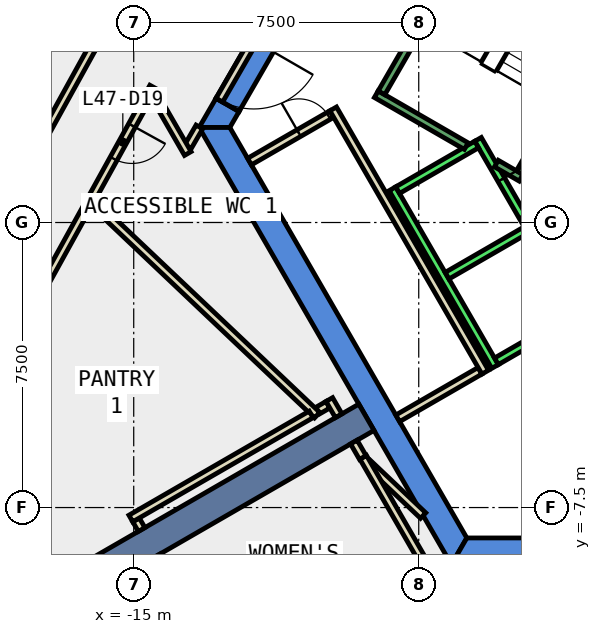
"""IFC4 building model, lengths in metres.
Left out: names, types, materials, properties, quantities, classifications, styles, units other than length and angle.
Written with IfcOpenShell. Run it as: python <this file> out.ifc"""

import sys

from ifc_helpers import new_model, si_unit, direction, frame, frame_2d, origin, place, context, subcontext, project, spatial, polyline, rectangle, outline, extrude, element, fill, save


model = new_model("IFC4")
c1 = context("Model", 3, precision=1e-05, world=origin(), true_north=direction((0.0, 1.0)))
c2 = subcontext(c1, "Body", "Model", "MODEL_VIEW")
j1 = project(units=[si_unit("LENGTHUNIT", "METRE"), si_unit("PLANEANGLEUNIT", "RADIAN")], contexts=[c1])
p1 = place(None, origin())
s1 = spatial("IfcSite", under=j1, at=p1, CompositionType="ELEMENT")
p2 = place(p1, origin())
s2 = spatial("IfcBuilding", under=s1, at=p2, CompositionType="ELEMENT")
p3 = place(p2, frame((0.0, 0.0, 210.8)))
s3 = spatial("IfcBuildingStorey", under=s2, at=p3, CompositionType="ELEMENT", Elevation=210.8)
p4 = place(p3, frame((0.0, 0.0, -0.4)))
e1 = element("IfcWall", 1, at=p4, inside=s3, PredefinedType="SHEAR", context=c2, shape_type="SweptSolid", body=[
    extrude(outline(polyline([(-12.228, 2.92), (-12.834, 3.27), (-13.279, 2.5), (-12.471, 2.5), (-12.228, 2.92)])), origin(), (0.0, 0.0, 1.0), 4.2),
])
p5 = place(p3, frame((0.0, 0.0, 3.6)))
e2 = element("IfcWall", 2, at=p5, inside=s3, PredefinedType="SHEAR", context=c2, shape_type="SweptSolid", body=[
    extrude(outline(polyline([(-12.834, 3.27), (-12.228, 2.92), (-11.228, 4.652), (-11.834, 5.002), (-12.834, 3.27)])), origin(), (0.0, 0.0, 1.0), 0.2),
])
p6 = place(p3, frame((0.0, 0.0, -0.4)))
e3 = element("IfcWall", 3, at=p6, inside=s3, PredefinedType="SHEAR", context=c2, shape_type="SweptSolid", body=[
    extrude(outline(polyline([(-13.279, 2.5), (-6.64, -9.0), (-6.235, -8.3), (-12.471, 2.5), (-13.279, 2.5)])), origin(), (0.0, 0.0, 1.0), 4.2),
])
p7 = place(p3, frame((0.0, 0.0, -0.4)))
e4 = element("IfcWall", 4, at=p7, inside=s3, PredefinedType="SHEAR", context=c2, shape_type="SweptSolid", body=[
    extrude(outline(polyline([(3.75, -9.0), (3.75, -8.3), (-6.235, -8.3), (-6.64, -9.0), (3.75, -9.0)])), origin(), (0.0, 0.0, 1.0), 4.2),
])
p8 = place(p3, frame((-8.877, -5.125, -0.4), z_axis=(0.0, 0.0, 1.0), x_axis=(-0.866017533419, -0.500013631625, 0.0)))
e5 = element("IfcWall", 5, at=p8, inside=s3, PredefinedType="SHEAR", context=c2, shape_type="SweptSolid", body=[
    extrude(rectangle(XDim=9.0, YDim=0.8, at=frame_2d((4.5, 0.0))), origin(), (0.0, 0.0, 1.0), 4.2),
])
p9 = place(p3, frame((-13.273, 2.514, 0.0), z_axis=(0.0, 0.0, 1.0), x_axis=(-0.50111559984, -0.865380353138, 0.0)))
e6 = element("IfcWall", 6, at=p9, inside=s3, PredefinedType="PARTITIONING", context=c2, shape_type="SweptSolid", body=[
    extrude(rectangle(XDim=0.606, YDim=0.2, at=frame_2d((0.303, 0.0))), origin(), (0.0, 0.0, 1.0), 3.8),
])
p10 = place(p3, frame((-13.577, 1.815, 0.0), z_axis=(0.0, 0.0, 1.0), x_axis=(-0.499951005625, 0.866053688852, 0.0)))
e7 = element("IfcWall", 7, at=p10, inside=s3, PredefinedType="PARTITIONING", context=c2, shape_type="SweptSolid", body=[
    extrude(rectangle(XDim=1.819, YDim=0.2, at=frame_2d((0.909, 0.0))), origin(), (0.0, 0.0, 1.0), 3.8),
])
p11 = place(p3, frame((-14.487, 3.564, 0.0), z_axis=(0.0, 0.0, 1.0), x_axis=(-0.483555199903, -0.875313868648, 0.0)))
e8 = element("IfcWall", 8, at=p11, inside=s3, PredefinedType="PARTITIONING", context=c2, shape_type="SweptSolid", body=[
    extrude(rectangle(XDim=3.309, YDim=0.2, at=frame_2d((1.654, 0.0))), origin(), (0.0, 0.0, 1.0), 3.8),
])
p12 = place(p11, frame((1.154, 0.0, 0.0)))
e9 = element("IfcOpeningElement", 9, at=p12, cuts=e8, PredefinedType="OPENING", context=c2, shape_type="SweptSolid", body=[
    extrude(rectangle(XDim=1.0, YDim=2.1, at=frame_2d((0.5, 1.05))), frame((0.0, 0.11, 0.0), z_axis=(0.0, -1.0, 0.0), x_axis=(1.0, 0.0, 0.0)), (0.0, 0.0, 1.0), 0.22),
])
p13 = place(p3, frame((-16.184, 0.493, 0.0), z_axis=(0.0, 0.0, 1.0), x_axis=(-0.48354397003, -0.875320072344, 0.0)))
e10 = element("IfcWall", 10, at=p13, inside=s3, PredefinedType="PARTITIONING", context=c2, shape_type="SweptSolid", body=[
    extrude(rectangle(XDim=4.467, YDim=0.2, at=frame_2d((2.233, 0.0))), origin(), (0.0, 0.0, 1.0), 3.8),
])
p14 = place(p3, frame((-18.015, 1.107, 0.0), z_axis=(0.0, 0.0, 1.0), x_axis=(0.483551557311, 0.875315880938, 0.0)))
e11 = element("IfcWall", 11, at=p14, inside=s3, PredefinedType="PARTITIONING", context=c2, shape_type="SweptSolid", body=[
    extrude(rectangle(XDim=3.987, YDim=0.2, at=frame_2d((1.994, 0.0))), origin(), (0.0, 0.0, 1.0), 3.8),
])
p15 = place(p3, frame((-5.888, -3.902, 0.0), z_axis=(0.0, 0.0, 1.0), x_axis=(-0.866022959057, -0.500004234368, 0.0)))
e12 = element("IfcWall", 12, at=p15, inside=s3, PredefinedType="PARTITIONING", context=c2, shape_type="SweptSolid", body=[
    extrude(rectangle(XDim=2.5, YDim=0.2, at=frame_2d((1.25, 0.0))), origin(), (0.0, 0.0, 1.0), 3.8),
])
p16 = place(p3, frame((-11.953, 1.603, 0.0), z_axis=(0.0, 0.0, 1.0), x_axis=(0.865998541277, 0.500046524342, 0.0)))
e13 = element("IfcWall", 13, at=p16, inside=s3, PredefinedType="PARTITIONING", context=c2, shape_type="SweptSolid", body=[
    extrude(rectangle(XDim=2.5, YDim=0.2, at=frame_2d((1.25, 0.0))), origin(), (0.0, 0.0, 1.0), 3.8),
])
p17 = place(p16, frame((1.5, 0.0, 0.0)))
e14 = element("IfcOpeningElement", 14, at=p17, cuts=e13, PredefinedType="OPENING", context=c2, shape_type="SweptSolid", body=[
    extrude(rectangle(XDim=0.9, YDim=2.1, at=frame_2d((0.45, 1.05))), frame((0.0, 0.11, 0.0), z_axis=(0.0, -1.0, 0.0), x_axis=(1.0, 0.0, 0.0)), (0.0, 0.0, 1.0), 0.22),
])
p18 = place(p3, frame((-9.751, 2.99, 0.0), z_axis=(0.0, 0.0, 1.0), x_axis=(0.500012163284, -0.866018381195, 0.0)))
e15 = element("IfcWall", 15, at=p18, inside=s3, PredefinedType="PARTITIONING", context=c2, shape_type="SweptSolid", body=[
    extrude(rectangle(XDim=8.0, YDim=0.2, at=frame_2d((4.0, 0.0))), origin(), (0.0, 0.0, 1.0), 3.8),
])
p19 = place(p3, frame((-8.84, -6.332, 0.0), z_axis=(0.0, 0.0, 1.0), x_axis=(0.726080635734, -0.687609562479, 0.0)))
e16 = element("IfcWall", 16, at=p19, inside=s3, PredefinedType="PARTITIONING", context=c2, shape_type="SweptSolid", body=[
    extrude(rectangle(XDim=2.005, YDim=0.2, at=frame_2d((1.003, 0.0))), origin(), (0.0, 0.0, 1.0), 3.8),
])
p20 = place(p3, frame((-7.283, -9.086, 0.0), z_axis=(0.0, 0.0, 1.0), x_axis=(-0.499883958536, 0.86609238999, 0.0)))
e17 = element("IfcWall", 17, at=p20, inside=s3, PredefinedType="PARTITIONING", context=c2, shape_type="SweptSolid", body=[
    extrude(rectangle(XDim=3.359, YDim=0.2, at=frame_2d((1.679, 0.0))), origin(), (0.0, 0.0, 1.0), 3.8),
])
p21 = place(p3, frame((-8.973, -6.183, 0.0), z_axis=(0.0, 0.0, 1.0), x_axis=(-0.499557093027, 0.86628096528, 0.0)))
e18 = element("IfcWall", 18, at=p21, inside=s3, PredefinedType="PARTITIONING", context=c2, shape_type="SweptSolid", body=[
    extrude(rectangle(XDim=0.469, YDim=0.2, at=frame_2d((0.234, 0.0))), origin(), (0.0, 0.0, 1.0), 3.8),
])
p22 = place(p3, frame((-9.89, -4.795, 0.0), z_axis=(0.0, 0.0, 1.0), x_axis=(-0.866447259568, -0.499268611457, 0.0)))
e19 = element("IfcWall", 19, at=p22, inside=s3, PredefinedType="PARTITIONING", context=c2, shape_type="SweptSolid", body=[
    extrude(rectangle(XDim=0.311, YDim=0.2, at=frame_2d((0.155, 0.0))), origin(), (0.0, 0.0, 1.0), 3.8),
])
p23 = place(p3, frame((-10.173, -5.069, 0.0), z_axis=(0.0, 0.0, 1.0), x_axis=(-0.725908697087, 0.687791075468, 0.0)))
e20 = element("IfcWall", 20, at=p23, inside=s3, PredefinedType="PARTITIONING", context=c2, shape_type="SweptSolid", body=[
    extrude(rectangle(XDim=8.313, YDim=0.2, at=frame_2d((4.157, 0.0))), origin(), (0.0, 0.0, 1.0), 3.8),
])
p24 = place(p3, frame((-14.792, -8.078, 0.0), z_axis=(0.0, 0.0, 1.0), x_axis=(-0.50241736454, 0.864625231999, 0.0)))
e21 = element("IfcWall", 21, at=p24, inside=s3, PredefinedType="PARTITIONING", context=c2, shape_type="SweptSolid", body=[
    extrude(rectangle(XDim=0.292, YDim=0.2, at=frame_2d((0.146, 0.0))), origin(), (0.0, 0.0, 1.0), 3.8),
])
p25 = place(p3, frame((-15.076, -7.788, 0.0), z_axis=(0.0, 0.0, 1.0), x_axis=(0.866092814325, 0.499883223337, 0.0)))
e22 = element("IfcWall", 22, at=p25, inside=s3, PredefinedType="PARTITIONING", context=c2, shape_type="SweptSolid", body=[
    extrude(rectangle(XDim=5.477, YDim=0.2, at=frame_2d((2.739, 0.0))), origin(), (0.0, 0.0, 1.0), 3.8),
])
p26 = place(p3, frame((-11.059, -14.545, 0.0), z_axis=(0.0, 0.0, 1.0), x_axis=(-0.499935899035, 0.866062409331, 0.0)))
e23 = element("IfcWall", 23, at=p26, inside=s3, PredefinedType="PARTITIONING", context=c2, shape_type="SweptSolid", body=[
    extrude(rectangle(XDim=6.667, YDim=0.2, at=frame_2d((3.333, 0.0))), origin(), (0.0, 0.0, 1.0), 3.8),
])
p27 = place(p3, frame((-11.747, 4.952, 0.0), z_axis=(0.0, 0.0, 1.0), x_axis=(-0.50002537861, -0.866010750942, 0.0)))
e24 = element("IfcWall", 24, at=p27, inside=s3, PredefinedType="PARTITIONING", context=c2, shape_type="SweptSolid", body=[
    extrude(rectangle(XDim=2.0, YDim=0.2, at=frame_2d((1.0, 0.0))), origin(), (0.0, 0.0, 1.0), 2.4),
])
p28 = place(p27, frame((0.19, 0.0, 0.0)))
e25 = element("IfcOpeningElement", 25, at=p28, cuts=e24, PredefinedType="OPENING", context=c2, shape_type="SweptSolid", body=[
    extrude(rectangle(XDim=1.8, YDim=2.1, at=frame_2d((0.9, 1.05))), frame((0.0, 0.11, 0.0), z_axis=(0.0, -1.0, 0.0), x_axis=(1.0, 0.0, 0.0)), (0.0, 0.0, 1.0), 0.22),
])
p29 = place(p3, frame((-9.607, -5.084, 0.0), z_axis=(0.0, 0.0, 1.0), x_axis=(-0.500194922027, 0.865912836248, 0.0)))
e26 = element("IfcWall", 26, at=p29, inside=s3, PredefinedType="PARTITIONING", context=c2, shape_type="SweptSolid", body=[
    extrude(rectangle(XDim=0.492, YDim=0.2, at=frame_2d((0.246, 0.0))), origin(), (0.0, 0.0, 1.0), 3.8),
])
p30 = place(p3, frame((-5.94, 2.188, 0.0), z_axis=(0.0, 0.0, 1.0), x_axis=(0.500034260056, -0.866005622828, 0.0)))
e27 = element("IfcWall", 27, at=p30, inside=s3, PredefinedType="STANDARD", context=c2, shape_type="SweptSolid", body=[
    extrude(rectangle(XDim=5.399, YDim=0.2, at=frame_2d((2.7, 0.0))), origin(), (0.0, 0.0, 1.0), 3.8),
])
p31 = place(p30, frame((3.075, 0.0, 0.0)))
e28 = element("IfcOpeningElement", 28, at=p31, cuts=e27, PredefinedType="OPENING", context=c2, shape_type="SweptSolid", body=[
    extrude(rectangle(XDim=1.1, YDim=2.1, at=frame_2d((0.55, 1.05))), frame((0.0, 0.11, 0.0), z_axis=(0.0, -1.0, 0.0), x_axis=(1.0, 0.0, 0.0)), (0.0, 0.0, 1.0), 0.22),
])
p32 = place(p30, frame((1.225, 0.0, 0.0)))
e29 = element("IfcOpeningElement", 29, at=p32, cuts=e27, PredefinedType="OPENING", context=c2, shape_type="SweptSolid", body=[
    extrude(rectangle(XDim=1.1, YDim=2.1, at=frame_2d((0.55, 1.05))), frame((0.0, 0.11, 0.0), z_axis=(0.0, -1.0, 0.0), x_axis=(1.0, 0.0, 0.0)), (0.0, 0.0, 1.0), 0.22),
])
p33 = place(p3, frame((-8.192, 0.888, 0.0), z_axis=(0.0, 0.0, 1.0), x_axis=(0.500034260056, -0.866005622828, 0.0)))
e30 = element("IfcWall", 30, at=p33, inside=s3, PredefinedType="STANDARD", context=c2, shape_type="SweptSolid", body=[
    extrude(rectangle(XDim=5.399, YDim=0.2, at=frame_2d((2.7, 0.0))), origin(), (0.0, 0.0, 1.0), 3.8),
])
for number, where, z_axis, x_axis in (
    (31, (-5.977, 2.052, 0.0), (0.0, 0.0, 1.0), (-0.866, -0.5, 0.0)),
    (32, (-4.677, -0.2, 0.0), (0.0, 0.0, 1.0), (-0.866, -0.5, 0.0)),
):
    element("IfcWall", number, at=place(p3, frame(where, z_axis=z_axis, x_axis=x_axis)), inside=s3, PredefinedType="STANDARD", context=c2, shape_type="SweptSolid", body=[
        extrude(rectangle(XDim=2.399, YDim=0.2, at=frame_2d((1.2, 0.0))), origin(), (0.0, 0.0, 1.0), 3.8),
    ])
p34 = place(p3, frame((-3.377, -2.452, 0.0), z_axis=(0.0, 0.0, 1.0), x_axis=(-0.865955154139, -0.50012165622, 0.0)))
e33 = element("IfcWall", 33, at=p34, inside=s3, PredefinedType="STANDARD", context=c2, shape_type="SweptSolid", body=[
    extrude(rectangle(XDim=2.4, YDim=0.2, at=frame_2d((1.2, 0.0))), origin(), (0.0, 0.0, 1.0), 3.8),
])
p35 = place(p3, frame((-6.25, 2.01, 0.0), z_axis=(0.0, 0.0, 1.0), x_axis=(-0.86611865017, 0.499838457731, 0.0)))
e34 = element("IfcWall", 34, at=p35, inside=s3, PredefinedType="STANDARD", context=c2, shape_type="SweptSolid", body=[
    extrude(rectangle(XDim=2.733, YDim=0.2, at=frame_2d((1.366, 0.0))), origin(), (0.0, 0.0, 1.0), 3.8),
])
p36 = place(p3, frame((-4.806, 1.176, 0.0), z_axis=(0.0, 0.0, 1.0), x_axis=(-0.866558586415, 0.499075361355, 0.0)))
e35 = element("IfcWall", 35, at=p36, inside=s3, PredefinedType="STANDARD", context=c2, shape_type="SweptSolid", body=[
    extrude(rectangle(XDim=0.751, YDim=0.2, at=frame_2d((0.376, 0.0))), origin(), (0.0, 0.0, 1.0), 3.8),
])
p37 = place(p3, frame((-1.393, 7.288, 0.0), z_axis=(0.0, 0.0, 1.0), x_axis=(-0.499963383562, -0.866046543262, 0.0)))
e36 = element("IfcWall", 36, at=p37, inside=s3, PredefinedType="STANDARD", context=c2, shape_type="SweptSolid", body=[
    extrude(rectangle(XDim=6.9, YDim=0.2, at=frame_2d((3.45, 0.0))), origin(), (0.0, 0.0, 1.0), 3.8),
])
p38 = place(p37, frame((0.45, 0.0, 0.0)))
e37 = element("IfcOpeningElement", 37, at=p38, cuts=e36, PredefinedType="OPENING", context=c2, shape_type="SweptSolid", body=[
    extrude(rectangle(XDim=1.1, YDim=2.2, at=frame_2d((0.55, 1.1))), frame((0.0, 0.11, 0.0), z_axis=(0.0, -1.0, 0.0), x_axis=(1.0, 0.0, 0.0)), (0.0, 0.0, 1.0), 0.22),
])
p39 = place(p3, frame((-5.03, 9.388, 0.0), z_axis=(0.0, 0.0, 1.0), x_axis=(-0.499978703459, -0.866037698999, 0.0)))
e38 = element("IfcWall", 38, at=p39, inside=s3, PredefinedType="STANDARD", context=c2, shape_type="SweptSolid", body=[
    extrude(rectangle(XDim=6.9, YDim=0.2, at=frame_2d((3.45, 0.0))), origin(), (0.0, 0.0, 1.0), 3.8),
])
p40 = place(p12, origin())
e39 = element("IfcDoor", 39, at=p40, inside=s3, OperationType="SINGLE_SWING_LEFT", PredefinedType="DOOR", context=c2, shape_type="SweptSolid", body=[
    extrude(rectangle(XDim=1.0, YDim=2.1, at=frame_2d((0.5, 1.05))), frame((0.0, 0.025, 0.0), z_axis=(0.0, -1.0, 0.0), x_axis=(1.0, 0.0, 0.0)), (0.0, 0.0, 1.0), 0.05),
])
fill(e9, e39)
p41 = place(p17, origin())
e40 = element("IfcDoor", 40, at=p41, inside=s3, OperationType="SINGLE_SWING_LEFT", PredefinedType="DOOR", context=c2, shape_type="SweptSolid", body=[
    extrude(rectangle(XDim=0.9, YDim=2.1, at=frame_2d((0.45, 1.05))), frame((0.0, 0.025, 0.0), z_axis=(0.0, -1.0, 0.0), x_axis=(1.0, 0.0, 0.0)), (0.0, 0.0, 1.0), 0.05),
])
fill(e14, e40)
p42 = place(p28, origin())
e41 = element("IfcDoor", 41, at=p42, inside=s3, OperationType="DOUBLE_DOOR_SINGLE_SWING", PredefinedType="DOOR", context=c2, shape_type="SweptSolid", body=[
    extrude(rectangle(XDim=1.8, YDim=2.1, at=frame_2d((0.9, 1.05))), frame((0.0, 0.025, 0.0), z_axis=(0.0, -1.0, 0.0), x_axis=(1.0, 0.0, 0.0)), (0.0, 0.0, 1.0), 0.05),
])
fill(e25, e41)
p43 = place(p32, origin())
e42 = element("IfcDoor", 42, at=p43, inside=s3, OperationType="SLIDING_TO_LEFT", PredefinedType="DOOR", context=c2, shape_type="SweptSolid", body=[
    extrude(rectangle(XDim=1.1, YDim=2.1, at=frame_2d((0.55, 1.05))), frame((0.0, 0.025, 0.0), z_axis=(0.0, -1.0, 0.0), x_axis=(1.0, 0.0, 0.0)), (0.0, 0.0, 1.0), 0.05),
])
fill(e29, e42)
save(model, sys.argv[1])
